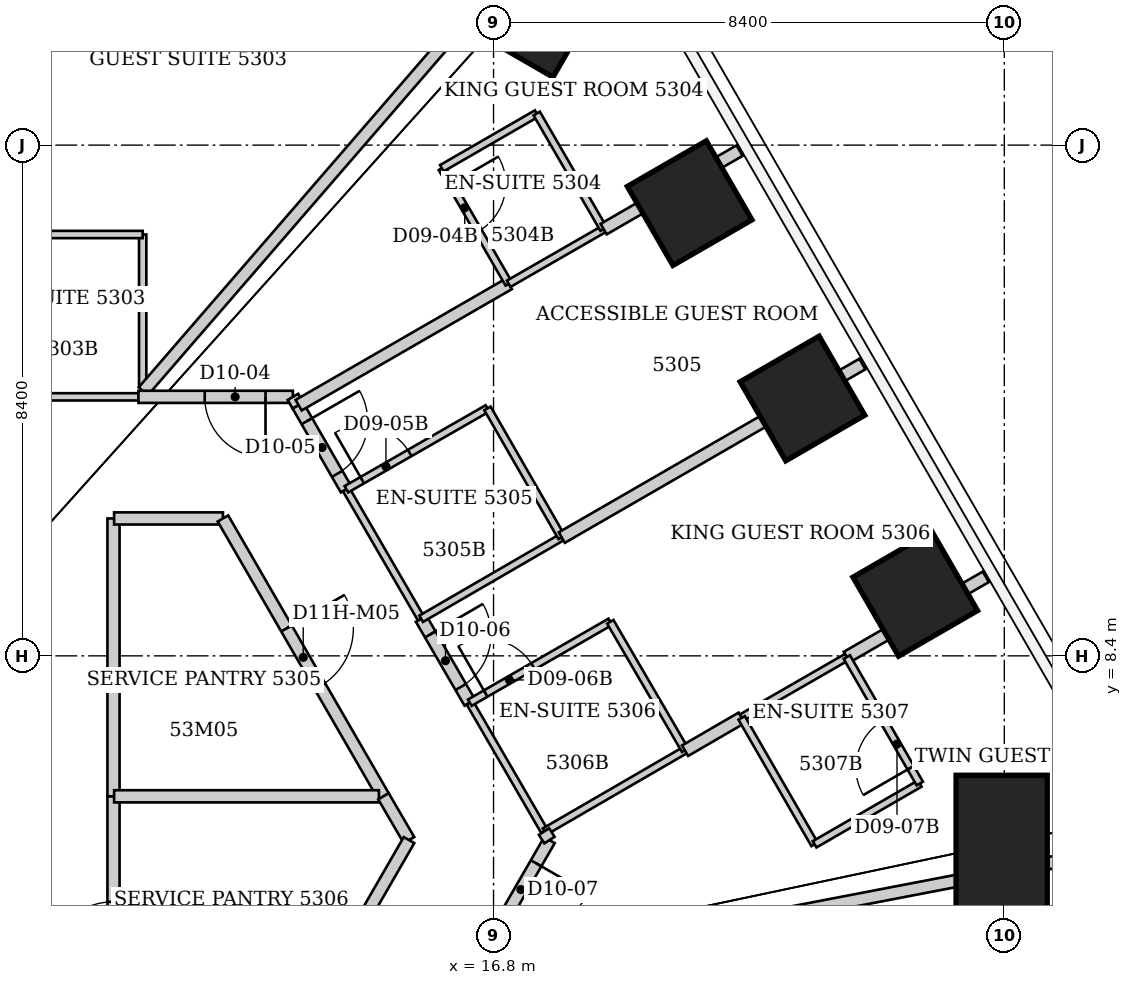
"""IFC4 building model, lengths in metres.
Left out: names, types, materials, properties, quantities, classifications, styles, units other than length and angle.
Written with IfcOpenShell. Run it as: python <this file> out.ifc"""

import sys

from ifc_helpers import new_model, si_unit, direction, frame, frame_2d, origin, origin_2d, place, context, subcontext, project, spatial, rectangle, extrude, element, fill, save


model = new_model("IFC4")
c1 = context("Model", 3, precision=1e-05, world=origin(), true_north=direction((0.0, 1.0)))
c2 = subcontext(c1, "Body", "Model", "MODEL_VIEW")
j1 = project(units=[si_unit("LENGTHUNIT", "METRE"), si_unit("PLANEANGLEUNIT", "RADIAN")], contexts=[c1])
p1 = place(None, origin())
s1 = spatial("IfcSite", under=j1, at=p1, CompositionType="ELEMENT")
p2 = place(p1, origin())
s2 = spatial("IfcBuilding", under=s1, at=p2, CompositionType="ELEMENT")
p3 = place(p2, frame((0.0, 0.0, 213.6)))
s3 = spatial("IfcBuildingStorey", under=s2, at=p3, CompositionType="ELEMENT", Elevation=213.6)
p4 = place(p3, frame((17.178, 19.131, 0.0), z_axis=(0.0, 0.0, 1.0), x_axis=(0.5, 0.866025403784, 0.0)))
e1 = element("IfcColumn", 1, at=p4, inside=s3, PredefinedType="COLUMN", context=c2, shape_type="SweptSolid", body=[
    extrude(rectangle(XDim=1.5, YDim=2.25, at=origin_2d()), origin(), (0.0, 0.0, 1.0), 3.8),
])
for number, where, z_axis, x_axis in (
    (2, (20.025, 15.846, 0.0), (0.0, 0.0, 1.0), (0.866, 0.5, 0.0)),
    (3, (21.88, 12.633, 0.0), (0.0, 0.0, 1.0), (0.866, 0.5, 0.0)),
    (4, (23.735, 9.419, 0.0), (0.0, 0.0, 1.0), (0.866, 0.5, 0.0)),
):
    element("IfcColumn", number, at=place(p3, frame(where, z_axis=z_axis, x_axis=x_axis)), inside=s3, PredefinedType="COLUMN", context=c2, shape_type="SweptSolid", body=[
        extrude(rectangle(XDim=1.5, YDim=1.5, at=origin_2d()), origin(), (0.0, 0.0, 1.0), 3.8),
    ])
p5 = place(p3, frame((25.156, 5.311, 0.0), z_axis=(0.0, 0.0, 1.0), x_axis=(1.0, 0.0, 0.0)))
e5 = element("IfcColumn", 5, at=p5, inside=s3, PredefinedType="COLUMN", context=c2, shape_type="SweptSolid", body=[
    extrude(rectangle(XDim=1.5, YDim=2.25, at=origin_2d()), origin(), (0.0, 0.0, 1.0), 3.8),
])
p6 = place(p3, frame((10.55, 1.52, 0.0), z_axis=(0.0, 0.0, 1.0), x_axis=(0.0, 1.0, 0.0)))
e6 = element("IfcWall", 6, at=p6, inside=s3, PredefinedType="PARTITIONING", context=c2, shape_type="SweptSolid", body=[
    extrude(rectangle(XDim=4.57, YDim=0.2, at=frame_2d((2.285, 0.0))), origin(), (0.0, 0.0, 1.0), 3.64),
])
p7 = place(p6, frame((1.735, 0.0, 0.0)))
e7 = element("IfcOpeningElement", 7, at=p7, cuts=e6, PredefinedType="OPENING", context=c2, shape_type="SweptSolid", body=[
    extrude(rectangle(XDim=1.1, YDim=2.2, at=frame_2d((0.55, 1.1))), frame((0.0, 0.1, 0.0), z_axis=(0.0, -1.0, 0.0), x_axis=(1.0, 0.0, 0.0)), (0.0, 0.0, 1.0), 0.2),
])
p8 = place(p3, frame((10.55, 6.09, 0.0), z_axis=(0.0, 0.0, 1.0), x_axis=(0.0, 1.0, 0.0)))
e8 = element("IfcWall", 8, at=p8, inside=s3, PredefinedType="PARTITIONING", context=c2, shape_type="SweptSolid", body=[
    extrude(rectangle(XDim=4.57, YDim=0.2, at=frame_2d((2.285, 0.0))), origin(), (0.0, 0.0, 1.0), 3.64),
])
p9 = place(p3, frame((10.56, 10.66, 0.0), z_axis=(0.0, 0.0, 1.0), x_axis=(1.0, 0.0, 0.0)))
e9 = element("IfcWall", 9, at=p9, inside=s3, PredefinedType="PARTITIONING", context=c2, shape_type="SweptSolid", body=[
    extrude(rectangle(XDim=1.79, YDim=0.2, at=frame_2d((0.895, 0.0))), origin(), (0.0, 0.0, 1.0), 3.64),
])
p10 = place(p3, frame((10.96, 12.66, 0.0), z_axis=(0.0, 0.0, 1.0), x_axis=(-1.0, 0.0, 0.0)))
e10 = element("IfcWall", 10, at=p10, inside=s3, PredefinedType="PARTITIONING", context=c2, shape_type="SweptSolid", body=[
    extrude(rectangle(XDim=2.43, YDim=0.12, at=frame_2d((1.215, 0.0))), origin(), (0.0, 0.0, 1.0), 3.64),
])
p11 = place(p3, frame((11.03, 12.83, 0.0), z_axis=(0.0, 0.0, 1.0), x_axis=(0.0, 1.0, 0.0)))
e11 = element("IfcWall", 11, at=p11, inside=s3, PredefinedType="PARTITIONING", context=c2, shape_type="SweptSolid", body=[
    extrude(rectangle(XDim=2.5, YDim=0.12, at=frame_2d((1.25, 0.0))), origin(), (0.0, 0.0, 1.0), 3.038),
])
p12 = place(p3, frame((11.03, 15.33, 0.0), z_axis=(0.0, 0.0, 1.0), x_axis=(-1.0, 0.0, 0.0)))
e12 = element("IfcWall", 12, at=p12, inside=s3, PredefinedType="PARTITIONING", context=c2, shape_type="SweptSolid", body=[
    extrude(rectangle(XDim=2.5, YDim=0.12, at=frame_2d((1.25, 0.0))), origin(), (0.0, 0.0, 1.0), 3.64),
])
p13 = place(p3, frame((11.04, 12.751, 0.0), z_axis=(0.0, 0.0, 1.0), x_axis=(0.654384042683, 0.756162366613, 0.0)))
e13 = element("IfcWall", 13, at=p13, inside=s3, PredefinedType="PARTITIONING", context=c2, shape_type="SweptSolid", body=[
    extrude(rectangle(XDim=10.667, YDim=0.2, at=frame_2d((5.333, 0.0))), origin(), (0.0, 0.0, 1.0), 3.64),
])
p14 = place(p3, frame((12.35, 10.66, 0.0), z_axis=(0.0, 0.0, 1.0), x_axis=(0.500213626659, -0.86590203124, 0.0)))
e14 = element("IfcWall", 14, at=p14, inside=s3, PredefinedType="PARTITIONING", context=c2, shape_type="SweptSolid", body=[
    extrude(rectangle(XDim=5.278, YDim=0.2, at=frame_2d((2.639, 0.0))), origin(), (0.0, 0.0, 1.0), 3.64),
])
p15 = place(p14, frame((2.089, 0.0, 0.0)))
e15 = element("IfcOpeningElement", 15, at=p15, cuts=e14, PredefinedType="OPENING", context=c2, shape_type="SweptSolid", body=[
    extrude(rectangle(XDim=1.1, YDim=2.2, at=frame_2d((0.55, 1.1))), frame((0.0, 0.1, 0.0), z_axis=(0.0, -1.0, 0.0), x_axis=(1.0, 0.0, 0.0)), (0.0, 0.0, 1.0), 0.2),
])
p16 = place(p3, frame((13.5, 12.66, 0.0), z_axis=(0.0, 0.0, 1.0), x_axis=(-1.0, 0.0, 0.0)))
e16 = element("IfcWall", 16, at=p16, inside=s3, PredefinedType="PARTITIONING", context=c2, shape_type="SweptSolid", body=[
    extrude(rectangle(XDim=2.54, YDim=0.2, at=frame_2d((1.27, 0.0))), origin(), (0.0, 0.0, 1.0), 3.64),
])
p17 = place(p16, frame((0.45, 0.0, 0.0)))
e17 = element("IfcOpeningElement", 17, at=p17, cuts=e16, PredefinedType="OPENING", context=c2, shape_type="SweptSolid", body=[
    extrude(rectangle(XDim=1.0, YDim=2.13, at=frame_2d((0.5, 1.065))), frame((0.0, 0.1, 0.0), z_axis=(0.0, -1.0, 0.0), x_axis=(1.0, 0.0, 0.0)), (0.0, 0.0, 1.0), 0.2),
])
p18 = place(p3, frame((13.5, 12.66, 0.0), z_axis=(0.0, 0.0, 1.0), x_axis=(0.498194987799, -0.867065023013, 0.0)))
e18 = element("IfcWall", 18, at=p18, inside=s3, PredefinedType="PARTITIONING", context=c2, shape_type="SweptSolid", body=[
    extrude(rectangle(XDim=0.166, YDim=0.2, at=frame_2d((0.083, 0.0))), origin(), (0.0, 0.0, 1.0), 3.64),
])
p19 = place(p3, frame((13.583, 12.516, 0.0), z_axis=(0.0, 0.0, 1.0), x_axis=(0.498534585837, -0.866869809559, 0.0)))
e19 = element("IfcWall", 19, at=p19, inside=s3, PredefinedType="PARTITIONING", context=c2, shape_type="SweptSolid", body=[
    extrude(rectangle(XDim=1.59, YDim=0.2, at=frame_2d((0.795, 0.0))), origin(), (0.0, 0.0, 1.0), 3.64),
])
p20 = place(p19, frame((0.295, 0.0, 0.0)))
e20 = element("IfcOpeningElement", 20, at=p20, cuts=e19, PredefinedType="OPENING", context=c2, shape_type="SweptSolid", body=[
    extrude(rectangle(XDim=1.0, YDim=2.13, at=frame_2d((0.5, 1.065))), frame((0.0, 0.1, 0.0), z_axis=(0.0, -1.0, 0.0), x_axis=(1.0, 0.0, 0.0)), (0.0, 0.0, 1.0), 0.2),
])
p21 = place(p3, frame((13.594, 12.522, 0.0), z_axis=(0.0, 0.0, 1.0), x_axis=(0.866085778049, 0.499895414124, 0.0)))
e21 = element("IfcWall", 21, at=p21, inside=s3, PredefinedType="PARTITIONING", context=c2, shape_type="SweptSolid", body=[
    extrude(rectangle(XDim=3.991, YDim=0.2, at=frame_2d((1.996, 0.0))), origin(), (0.0, 0.0, 1.0), 3.64),
])
p22 = place(p3, frame((14.375, 11.137, 0.0), z_axis=(0.0, 0.0, 1.0), x_axis=(0.501931973027, -0.864907101632, 0.0)))
e22 = element("IfcWall", 22, at=p22, inside=s3, PredefinedType="PARTITIONING", context=c2, shape_type="SweptSolid", body=[
    extrude(rectangle(XDim=2.46, YDim=0.12, at=frame_2d((1.23, 0.0))), origin(), (0.0, 0.0, 1.0), 3.64),
])
p23 = place(p3, frame((14.915, 6.09, 0.0), z_axis=(0.0, 0.0, 1.0), x_axis=(-1.0, 0.0, 0.0)))
e23 = element("IfcWall", 23, at=p23, inside=s3, PredefinedType="PARTITIONING", context=c2, shape_type="SweptSolid", body=[
    extrude(rectangle(XDim=4.355, YDim=0.2, at=frame_2d((2.177, 0.0))), origin(), (0.0, 0.0, 1.0), 3.64),
])
p24 = place(p3, frame((14.99, 6.09, 0.0), z_axis=(0.0, 0.0, 1.0), x_axis=(0.503816387241, -0.863810770914, 0.0)))
e24 = element("IfcWall", 24, at=p24, inside=s3, PredefinedType="PARTITIONING", context=c2, shape_type="SweptSolid", body=[
    extrude(rectangle(XDim=0.833, YDim=0.2, at=frame_2d((0.417, 0.0))), origin(), (0.0, 0.0, 1.0), 3.64),
])
p25 = place(p3, frame((15.41, 5.37, 0.0), z_axis=(0.0, 0.0, 1.0), x_axis=(-0.499513190454, -0.866306281036, 0.0)))
e25 = element("IfcWall", 25, at=p25, inside=s3, PredefinedType="PARTITIONING", context=c2, shape_type="SweptSolid", body=[
    extrude(rectangle(XDim=4.444, YDim=0.2, at=frame_2d((2.222, 0.0))), origin(), (0.0, 0.0, 1.0), 3.64),
])
p26 = place(p3, frame((15.61, 9.01, 0.0), z_axis=(0.0, 0.0, 1.0), x_axis=(0.5014706583, -0.865174652232, 0.0)))
e26 = element("IfcWall", 26, at=p26, inside=s3, PredefinedType="PARTITIONING", context=c2, shape_type="SweptSolid", body=[
    extrude(rectangle(XDim=1.595, YDim=0.2, at=frame_2d((0.797, 0.0))), origin(), (0.0, 0.0, 1.0), 3.64),
])
p27 = place(p26, frame((0.298, 0.0, 0.0)))
e27 = element("IfcOpeningElement", 27, at=p27, cuts=e26, PredefinedType="OPENING", context=c2, shape_type="SweptSolid", body=[
    extrude(rectangle(XDim=1.0, YDim=2.13, at=frame_2d((0.5, 1.065))), frame((0.0, 0.1, 0.0), z_axis=(0.0, -1.0, 0.0), x_axis=(1.0, 0.0, 0.0)), (0.0, 0.0, 1.0), 0.2),
])
p28 = place(p3, frame((15.95, 16.42, 0.0), z_axis=(0.0, 0.0, 1.0), x_axis=(0.501088872721, -0.865395829453, 0.0)))
e28 = element("IfcWall", 28, at=p28, inside=s3, PredefinedType="PARTITIONING", context=c2, shape_type="SweptSolid", body=[
    extrude(rectangle(XDim=2.195, YDim=0.12, at=frame_2d((1.098, 0.0))), origin(), (0.0, 0.0, 1.0), 3.64),
])
p29 = place(p28, frame((0.3, 0.0, 0.0)))
e29 = element("IfcOpeningElement", 29, at=p29, cuts=e28, PredefinedType="OPENING", context=c2, shape_type="SweptSolid", body=[
    extrude(rectangle(XDim=0.9, YDim=2.03, at=frame_2d((0.45, 1.015))), frame((0.0, 0.06, 0.0), z_axis=(0.0, -1.0, 0.0), x_axis=(1.0, 0.0, 0.0)), (0.0, 0.0, 1.0), 0.12),
])
p30 = place(p3, frame((16.41, 7.63, 0.0), z_axis=(0.0, 0.0, 1.0), x_axis=(0.501856726365, -0.86495076519, 0.0)))
e30 = element("IfcWall", 30, at=p30, inside=s3, PredefinedType="PARTITIONING", context=c2, shape_type="SweptSolid", body=[
    extrude(rectangle(XDim=2.451, YDim=0.12, at=frame_2d((1.226, 0.0))), origin(), (0.0, 0.0, 1.0), 3.64),
])
p31 = place(p3, frame((16.45, 3.17, 0.0), z_axis=(0.0, 0.0, 1.0), x_axis=(0.499922110319, 0.866070368743, 0.0)))
e31 = element("IfcWall", 31, at=p31, inside=s3, PredefinedType="PARTITIONING", context=c2, shape_type="SweptSolid", body=[
    extrude(rectangle(XDim=2.541, YDim=0.2, at=frame_2d((1.27, 0.0))), origin(), (0.0, 0.0, 1.0), 3.64),
])
p32 = place(p31, frame((1.1, 0.0, 0.0)))
e32 = element("IfcOpeningElement", 32, at=p32, cuts=e31, PredefinedType="OPENING", context=c2, shape_type="SweptSolid", body=[
    extrude(rectangle(XDim=1.0, YDim=2.13, at=frame_2d((0.5, 1.065))), frame((0.0, 0.1, 0.0), z_axis=(0.0, -1.0, 0.0), x_axis=(1.0, 0.0, 0.0)), (0.0, 0.0, 1.0), 0.2),
])
p33 = place(p3, frame((16.7, 12.47, 0.0), z_axis=(0.0, 0.0, 1.0), x_axis=(-0.867545659855, -0.497357545501, 0.0)))
e33 = element("IfcWall", 33, at=p33, inside=s3, PredefinedType="PARTITIONING", context=c2, shape_type="SweptSolid", body=[
    extrude(rectangle(XDim=2.674, YDim=0.12, at=frame_2d((1.337, 0.0))), origin(), (0.0, 0.0, 1.0), 3.64),
])
p34 = place(p33, frame((1.474, 0.0, 0.0)))
e34 = element("IfcOpeningElement", 34, at=p34, cuts=e33, PredefinedType="OPENING", context=c2, shape_type="SweptSolid", body=[
    extrude(rectangle(XDim=0.9, YDim=2.03, at=frame_2d((0.45, 1.015))), frame((0.0, 0.06, 0.0), z_axis=(0.0, -1.0, 0.0), x_axis=(1.0, 0.0, 0.0)), (0.0, 0.0, 1.0), 0.12),
])
for number, where, z_axis, x_axis in (
    (35, (17.05, 14.52, 0.0), (0.0, 0.0, 1.0), (0.867, 0.499, 0.0)),
    (36, (17.51, 17.32, 0.0), (0.0, 0.0, 1.0), (-0.866, -0.5, 0.0)),
):
    element("IfcWall", number, at=place(p3, frame(where, z_axis=z_axis, x_axis=x_axis)), inside=s3, PredefinedType="PARTITIONING", context=c2, shape_type="SweptSolid", body=[
        extrude(rectangle(XDim=1.801, YDim=0.12, at=frame_2d((0.9, 0.0))), origin(), (0.0, 0.0, 1.0), 3.64),
    ])
p35 = place(p3, frame((17.64, 5.51, 0.0), z_axis=(0.0, 0.0, 1.0), x_axis=(0.86498992408, 0.501789229896, 0.0)))
e37 = element("IfcWall", 37, at=p35, inside=s3, PredefinedType="PARTITIONING", context=c2, shape_type="SweptSolid", body=[
    extrude(rectangle(XDim=2.671, YDim=0.12, at=frame_2d((1.335, 0.0))), origin(), (0.0, 0.0, 1.0), 3.64),
])
p36 = place(p3, frame((17.72, 5.37, 0.0), z_axis=(0.0, 0.0, 1.0), x_axis=(-0.540386452408, 0.841416948994, 0.0)))
e38 = element("IfcWall", 38, at=p36, inside=s3, PredefinedType="PARTITIONING", context=c2, shape_type="SweptSolid", body=[
    extrude(rectangle(XDim=0.166, YDim=0.2, at=frame_2d((0.083, 0.0))), origin(), (0.0, 0.0, 1.0), 3.64),
])
p37 = place(p3, frame((17.92, 10.35, 0.0), z_axis=(0.0, 0.0, 1.0), x_axis=(-0.864966903181, -0.501828911485, 0.0)))
e39 = element("IfcWall", 39, at=p37, inside=s3, PredefinedType="PARTITIONING", context=c2, shape_type="SweptSolid", body=[
    extrude(rectangle(XDim=2.67, YDim=0.12, at=frame_2d((1.335, 0.0))), origin(), (0.0, 0.0, 1.0), 2.878),
])
p38 = place(p3, frame((17.92, 10.35, 0.0), z_axis=(0.0, 0.0, 1.0), x_axis=(-0.498791783817, 0.866721844883, 0.0)))
e40 = element("IfcWall", 40, at=p38, inside=s3, PredefinedType="PARTITIONING", context=c2, shape_type="SweptSolid", body=[
    extrude(rectangle(XDim=2.446, YDim=0.12, at=frame_2d((1.223, 0.0))), origin(), (0.0, 0.0, 1.0), 3.64),
])
p39 = place(p3, frame((17.923, 10.345, 0.0), z_axis=(0.0, 0.0, 1.0), x_axis=(0.865991848905, 0.500058114253, 0.0)))
e41 = element("IfcWall", 41, at=p39, inside=s3, PredefinedType="PARTITIONING", context=c2, shape_type="SweptSolid", body=[
    extrude(rectangle(XDim=5.708, YDim=0.2, at=frame_2d((2.854, 0.0))), origin(), (0.0, 0.0, 1.0), 2.878),
])
p40 = place(p3, frame((18.61, 15.42, 0.0), z_axis=(0.0, 0.0, 1.0), x_axis=(-0.501040653706, 0.865423747845, 0.0)))
e42 = element("IfcWall", 42, at=p40, inside=s3, PredefinedType="PARTITIONING", context=c2, shape_type="SweptSolid", body=[
    extrude(rectangle(XDim=2.196, YDim=0.12, at=frame_2d((1.098, 0.0))), origin(), (0.0, 0.0, 1.0), 3.64),
])
p41 = place(p3, frame((18.611, 15.418, 0.0), z_axis=(0.0, 0.0, 1.0), x_axis=(0.865870535136, 0.500268144481, 0.0)))
e43 = element("IfcWall", 43, at=p41, inside=s3, PredefinedType="PARTITIONING", context=c2, shape_type="SweptSolid", body=[
    extrude(rectangle(XDim=2.582, YDim=0.2, at=frame_2d((1.291, 0.0))), origin(), (0.0, 0.0, 1.0), 3.64),
])
p42 = place(p3, frame((18.72, 8.96, 0.0), z_axis=(0.0, 0.0, 1.0), x_axis=(-0.866654860089, -0.498908161372, 0.0)))
e44 = element("IfcWall", 44, at=p42, inside=s3, PredefinedType="PARTITIONING", context=c2, shape_type="SweptSolid", body=[
    extrude(rectangle(XDim=2.666, YDim=0.12, at=frame_2d((1.333, 0.0))), origin(), (0.0, 0.0, 1.0), 3.64),
])
p43 = place(p42, frame((1.466, 0.0, 0.0)))
e45 = element("IfcOpeningElement", 45, at=p43, cuts=e44, PredefinedType="OPENING", context=c2, shape_type="SweptSolid", body=[
    extrude(rectangle(XDim=0.9, YDim=2.03, at=frame_2d((0.45, 1.015))), frame((0.0, 0.06, 0.0), z_axis=(0.0, -1.0, 0.0), x_axis=(1.0, 0.0, 0.0)), (0.0, 0.0, 1.0), 0.12),
])
p44 = place(p3, frame((19.95, 6.85, 0.0), z_axis=(0.0, 0.0, 1.0), x_axis=(-0.503634814725, 0.863916647251, 0.0)))
e46 = element("IfcWall", 46, at=p44, inside=s3, PredefinedType="PARTITIONING", context=c2, shape_type="SweptSolid", body=[
    extrude(rectangle(XDim=2.442, YDim=0.12, at=frame_2d((1.221, 0.0))), origin(), (0.0, 0.0, 1.0), 3.64),
])
p45 = place(p3, frame((20.878, 7.383, 0.0), z_axis=(0.0, 0.0, 1.0), x_axis=(0.866697688948, 0.498833755847, 0.0)))
e47 = element("IfcWall", 47, at=p45, inside=s3, PredefinedType="PARTITIONING", context=c2, shape_type="SweptSolid", body=[
    extrude(rectangle(XDim=1.998, YDim=0.12, at=frame_2d((0.999, 0.0))), origin(), (0.0, 0.0, 1.0), 3.64),
])
p46 = place(p3, frame((20.88, 7.38, 0.0), z_axis=(0.0, 0.0, 1.0), x_axis=(-0.864855730486, -0.502020483094, 0.0)))
e48 = element("IfcWall", 48, at=p46, inside=s3, PredefinedType="PARTITIONING", context=c2, shape_type="SweptSolid", body=[
    extrude(rectangle(XDim=1.075, YDim=0.2, at=frame_2d((0.538, 0.0))), origin(), (0.0, 0.0, 1.0), 3.64),
])
p47 = place(p3, frame((20.88, 7.38, 0.0), z_axis=(0.0, 0.0, 1.0), x_axis=(0.499813401482, -0.866133109688, 0.0)))
e49 = element("IfcWall", 49, at=p47, inside=s3, PredefinedType="PARTITIONING", context=c2, shape_type="SweptSolid", body=[
    extrude(rectangle(XDim=2.401, YDim=0.12, at=frame_2d((1.201, 0.0))), origin(), (0.0, 0.0, 1.0), 3.64),
])
p48 = place(p3, frame((22.08, 5.3, 0.0), z_axis=(0.0, 0.0, 1.0), x_axis=(0.865766263046, 0.50044857655, 0.0)))
e50 = element("IfcWall", 50, at=p48, inside=s3, PredefinedType="PARTITIONING", context=c2, shape_type="SweptSolid", body=[
    extrude(rectangle(XDim=1.998, YDim=0.12, at=frame_2d((0.999, 0.0))), origin(), (0.0, 0.0, 1.0), 3.64),
])
p49 = place(p3, frame((22.61, 8.38, 0.0), z_axis=(0.0, 0.0, 1.0), x_axis=(0.865974560031, 0.500088053625, 0.0)))
e51 = element("IfcWall", 51, at=p49, inside=s3, PredefinedType="PARTITIONING", context=c2, shape_type="SweptSolid", body=[
    extrude(rectangle(XDim=2.64, YDim=0.2, at=frame_2d((1.32, 0.0))), origin(), (0.0, 0.0, 1.0), 3.64),
])
p50 = place(p3, frame((23.81, 6.3, 0.0), z_axis=(0.0, 0.0, 1.0), x_axis=(-0.499737123639, 0.866177122335, 0.0)))
e52 = element("IfcWall", 52, at=p50, inside=s3, PredefinedType="PARTITIONING", context=c2, shape_type="SweptSolid", body=[
    extrude(rectangle(XDim=2.401, YDim=0.12, at=frame_2d((1.201, 0.0))), origin(), (0.0, 0.0, 1.0), 3.64),
])
p51 = place(p50, frame((0.3, 0.0, 0.0)))
e53 = element("IfcOpeningElement", 53, at=p51, cuts=e52, PredefinedType="OPENING", context=c2, shape_type="SweptSolid", body=[
    extrude(rectangle(XDim=0.9, YDim=2.03, at=frame_2d((0.45, 1.015))), frame((0.0, 0.06, 0.0), z_axis=(0.0, -1.0, 0.0), x_axis=(1.0, 0.0, 0.0)), (0.0, 0.0, 1.0), 0.12),
])
p52 = place(p3, frame((27.041, 5.204, 0.0), z_axis=(0.0, 0.0, 1.0), x_axis=(-0.98204561609, -0.188643600256, 0.0)))
e54 = element("IfcWall", 54, at=p52, inside=s3, PredefinedType="PARTITIONING", context=c2, shape_type="SweptSolid", body=[
    extrude(rectangle(XDim=10.664, YDim=0.2, at=frame_2d((5.332, 0.0))), origin(), (0.0, 0.0, 1.0), 3.64),
])
p53 = place(p17, origin())
e55 = element("IfcDoor", 55, at=p53, inside=s3, OperationType="SINGLE_SWING_LEFT", PredefinedType="DOOR", context=c2, shape_type="SweptSolid", body=[
    extrude(rectangle(XDim=1.0, YDim=2.13, at=frame_2d((0.5, 1.065))), frame((0.0, 0.025, 0.0), z_axis=(0.0, -1.0, 0.0), x_axis=(1.0, 0.0, 0.0)), (0.0, 0.0, 1.0), 0.05),
])
fill(e17, e55)
p54 = place(p29, origin())
e56 = element("IfcDoor", 56, at=p54, inside=s3, OperationType="SINGLE_SWING_LEFT", PredefinedType="DOOR", context=c2, shape_type="SweptSolid", body=[
    extrude(rectangle(XDim=0.9, YDim=2.03, at=frame_2d((0.45, 1.015))), frame((0.0, 0.025, 0.0), z_axis=(0.0, -1.0, 0.0), x_axis=(1.0, 0.0, 0.0)), (0.0, 0.0, 1.0), 0.05),
])
fill(e29, e56)
p55 = place(p20, origin())
e57 = element("IfcDoor", 57, at=p55, inside=s3, OperationType="SINGLE_SWING_LEFT", PredefinedType="DOOR", context=c2, shape_type="SweptSolid", body=[
    extrude(rectangle(XDim=1.0, YDim=2.13, at=frame_2d((0.5, 1.065))), frame((0.0, 0.025, 0.0), z_axis=(0.0, -1.0, 0.0), x_axis=(1.0, 0.0, 0.0)), (0.0, 0.0, 1.0), 0.05),
])
fill(e20, e57)
p56 = place(p34, origin())
e58 = element("IfcDoor", 58, at=p56, inside=s3, OperationType="SINGLE_SWING_RIGHT", PredefinedType="DOOR", context=c2, shape_type="SweptSolid", body=[
    extrude(rectangle(XDim=0.9, YDim=2.03, at=frame_2d((0.45, 1.015))), frame((0.0, 0.025, 0.0), z_axis=(0.0, -1.0, 0.0), x_axis=(1.0, 0.0, 0.0)), (0.0, 0.0, 1.0), 0.05),
])
fill(e34, e58)
p57 = place(p27, origin())
e59 = element("IfcDoor", 59, at=p57, inside=s3, OperationType="SINGLE_SWING_LEFT", PredefinedType="DOOR", context=c2, shape_type="SweptSolid", body=[
    extrude(rectangle(XDim=1.0, YDim=2.13, at=frame_2d((0.5, 1.065))), frame((0.0, 0.025, 0.0), z_axis=(0.0, -1.0, 0.0), x_axis=(1.0, 0.0, 0.0)), (0.0, 0.0, 1.0), 0.05),
])
fill(e27, e59)
p58 = place(p43, origin())
e60 = element("IfcDoor", 60, at=p58, inside=s3, OperationType="SINGLE_SWING_RIGHT", PredefinedType="DOOR", context=c2, shape_type="SweptSolid", body=[
    extrude(rectangle(XDim=0.9, YDim=2.03, at=frame_2d((0.45, 1.015))), frame((0.0, 0.025, 0.0), z_axis=(0.0, -1.0, 0.0), x_axis=(1.0, 0.0, 0.0)), (0.0, 0.0, 1.0), 0.05),
])
fill(e45, e60)
p59 = place(p32, origin())
e61 = element("IfcDoor", 61, at=p59, inside=s3, OperationType="SINGLE_SWING_RIGHT", PredefinedType="DOOR", context=c2, shape_type="SweptSolid", body=[
    extrude(rectangle(XDim=1.0, YDim=2.13, at=frame_2d((0.5, 1.065))), frame((0.0, 0.025, 0.0), z_axis=(0.0, -1.0, 0.0), x_axis=(1.0, 0.0, 0.0)), (0.0, 0.0, 1.0), 0.05),
])
fill(e32, e61)
p60 = place(p51, origin())
e62 = element("IfcDoor", 62, at=p60, inside=s3, OperationType="SINGLE_SWING_LEFT", PredefinedType="DOOR", context=c2, shape_type="SweptSolid", body=[
    extrude(rectangle(XDim=0.9, YDim=2.03, at=frame_2d((0.45, 1.015))), frame((0.0, 0.025, 0.0), z_axis=(0.0, -1.0, 0.0), x_axis=(1.0, 0.0, 0.0)), (0.0, 0.0, 1.0), 0.05),
])
fill(e53, e62)
p61 = place(p15, origin())
e63 = element("IfcDoor", 63, at=p61, inside=s3, OperationType="SINGLE_SWING_LEFT", PredefinedType="DOOR", context=c2, shape_type="SweptSolid", body=[
    extrude(rectangle(XDim=1.1, YDim=2.2, at=frame_2d((0.55, 1.1))), frame((0.0, 0.025, 0.0), z_axis=(0.0, -1.0, 0.0), x_axis=(1.0, 0.0, 0.0)), (0.0, 0.0, 1.0), 0.05),
])
fill(e15, e63)
p62 = place(p7, origin())
e64 = element("IfcDoor", 64, at=p62, inside=s3, OperationType="SINGLE_SWING_LEFT", PredefinedType="DOOR", context=c2, shape_type="SweptSolid", body=[
    extrude(rectangle(XDim=1.1, YDim=2.2, at=frame_2d((0.55, 1.1))), frame((0.0, 0.025, 0.0), z_axis=(0.0, -1.0, 0.0), x_axis=(1.0, 0.0, 0.0)), (0.0, 0.0, 1.0), 0.05),
])
fill(e7, e64)
save(model, sys.argv[1])
